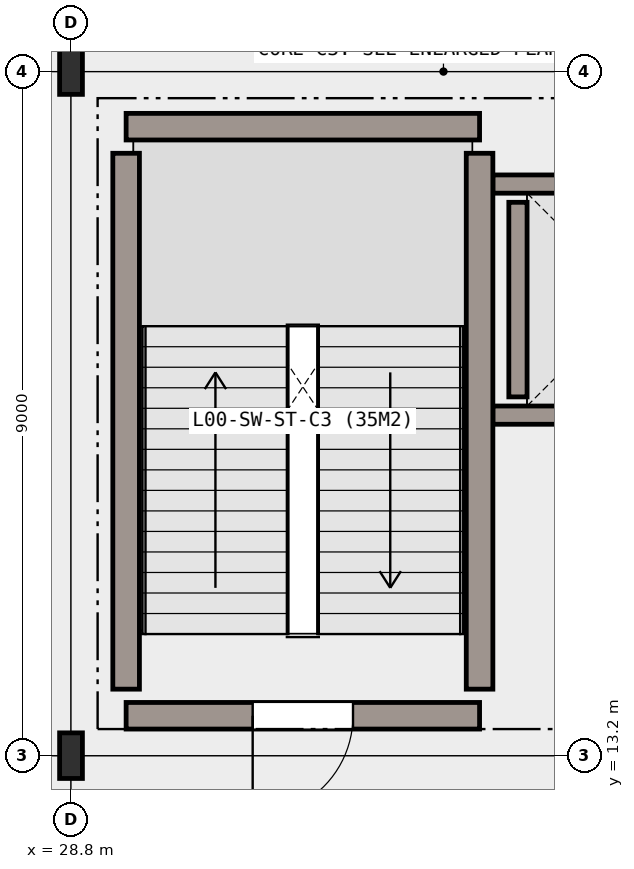
"""IFC4 building model, lengths in metres.
Left out: names, types, materials, properties, quantities, classifications, styles, units other than length and angle.
Written with IfcOpenShell. Run it as: python <this file> out.ifc"""

import sys

from ifc_helpers import new_model, si_unit, direction, frame, frame_2d, origin, origin_2d, place, context, subcontext, project, spatial, rectangle, i_section, extrude, element, fill, save


model = new_model("IFC4")
c1 = context("Model", 3, precision=1e-05, world=origin(), true_north=direction((0.0, 1.0)))
c2 = subcontext(c1, "Body", "Model", "MODEL_VIEW")
j1 = project(units=[si_unit("LENGTHUNIT", "METRE"), si_unit("PLANEANGLEUNIT", "RADIAN")], contexts=[c1])
p1 = place(None, origin())
s1 = spatial("IfcSite", under=j1, at=p1, CompositionType="ELEMENT")
p2 = place(p1, origin())
s2 = spatial("IfcBuilding", under=s1, at=p2, CompositionType="ELEMENT")
p3 = place(p2, origin())
s3 = spatial("IfcBuildingStorey", under=s2, at=p3, CompositionType="ELEMENT", Elevation=0.0)
for number, where, z_axis, x_axis in (
    (1, (28.8, 13.2, 0.0), (0.0, 0.0, 1.0), (1.0, 0.0, 0.0)),
    (2, (28.8, 22.2, 0.0), (0.0, 0.0, 1.0), (1.0, 0.0, 0.0)),
):
    element("IfcColumn", number, at=place(p3, frame(where, z_axis=z_axis, x_axis=x_axis)), inside=s3, PredefinedType="COLUMN", context=c2, shape_type="SweptSolid", body=[
        extrude(i_section(OverallWidth=0.3, OverallDepth=0.6, WebThickness=0.015, FlangeThickness=0.03, FilletRadius=0.027, at=origin_2d()), origin(), (0.0, 0.0, 1.0), 5.4),
    ])
p4 = place(p3, frame((37.72, 17.68, 0.0), z_axis=(0.0, 0.0, 1.0), x_axis=(-1.0, 0.0, 0.0)))
e3 = element("IfcWall", 3, at=p4, inside=s3, PredefinedType="SHEAR", context=c2, shape_type="SweptSolid", body=[
    extrude(rectangle(XDim=3.37, YDim=0.24, at=frame_2d((1.685, 0.0))), origin(), (0.0, 0.0, 1.0), 5.12),
])
p5 = place(p4, frame((0.94, 0.0, 0.0)))
e4 = element("IfcOpeningElement", 4, at=p5, cuts=e3, PredefinedType="OPENING", context=c2, shape_type="SweptSolid", body=[
    extrude(rectangle(XDim=1.16, YDim=2.15, at=frame_2d((0.58, 1.075))), frame((0.0, 0.13, 0.0), z_axis=(0.0, -1.0, 0.0), x_axis=(1.0, 0.0, 0.0)), (0.0, 0.0, 1.0), 0.26),
])
p6 = place(p3, frame((34.35, 20.72, 0.0), z_axis=(0.0, 0.0, 1.0), x_axis=(1.0, 0.0, 0.0)))
e5 = element("IfcWall", 5, at=p6, inside=s3, PredefinedType="SHEAR", context=c2, shape_type="SweptSolid", body=[
    extrude(rectangle(XDim=3.37, YDim=0.24, at=frame_2d((1.685, 0.0))), origin(), (0.0, 0.0, 1.0), 5.12),
])
p7 = place(p3, frame((34.68, 17.92, 0.0), z_axis=(0.0, 0.0, 1.0), x_axis=(0.0, 1.0, 0.0)))
e6 = element("IfcWall", 6, at=p7, inside=s3, PredefinedType="SHEAR", context=c2, shape_type="SweptSolid", body=[
    extrude(rectangle(XDim=2.56, YDim=0.24, at=frame_2d((1.28, 0.0))), origin(), (0.0, 0.0, 1.0), 5.12),
])
p8 = place(p3, frame((34.175, 13.725, 0.0), z_axis=(0.0, 0.0, 1.0), x_axis=(-1.0, 0.0, 0.0)))
e7 = element("IfcWall", 7, at=p8, inside=s3, PredefinedType="SHEAR", context=c2, shape_type="SweptSolid", body=[
    extrude(rectangle(XDim=4.65, YDim=0.35, at=frame_2d((2.325, 0.0))), origin(), (0.0, 0.0, 1.0), 5.12),
])
p9 = place(p8, frame((1.665, 0.0, 0.0)))
e8 = element("IfcOpeningElement", 8, at=p9, cuts=e7, PredefinedType="OPENING", context=c2, shape_type="SweptSolid", body=[
    extrude(rectangle(XDim=1.32, YDim=2.15, at=frame_2d((0.66, 1.075))), frame((0.0, 0.185, 0.0), z_axis=(0.0, -1.0, 0.0), x_axis=(1.0, 0.0, 0.0)), (0.0, 0.0, 1.0), 0.37),
])
p10 = place(p3, frame((29.525, 21.475, 0.0), z_axis=(0.0, 0.0, 1.0), x_axis=(1.0, 0.0, 0.0)))
e9 = element("IfcWall", 9, at=p10, inside=s3, PredefinedType="SHEAR", context=c2, shape_type="SweptSolid", body=[
    extrude(rectangle(XDim=4.65, YDim=0.35, at=frame_2d((2.325, 0.0))), origin(), (0.0, 0.0, 1.0), 5.12),
])
for number, where, z_axis, x_axis in (
    (10, (29.525, 14.075, 0.0), (0.0, 0.0, 1.0), (0.0, 1.0, 0.0)),
    (11, (34.175, 21.125, 0.0), (0.0, 0.0, 1.0), (0.0, -1.0, 0.0)),
):
    element("IfcWall", number, at=place(p3, frame(where, z_axis=z_axis, x_axis=x_axis)), inside=s3, PredefinedType="SHEAR", context=c2, shape_type="SweptSolid", body=[
        extrude(rectangle(XDim=7.05, YDim=0.35, at=frame_2d((3.525, 0.0))), origin(), (0.0, 0.0, 1.0), 5.12),
    ])
p11 = place(p9, origin())
e12 = element("IfcDoor", 12, at=p11, inside=s3, OperationType="SINGLE_SWING_RIGHT", PredefinedType="DOOR", context=c2, shape_type="SweptSolid", body=[
    extrude(rectangle(XDim=1.32, YDim=2.15, at=frame_2d((0.66, 1.075))), frame((0.0, 0.025, 0.0), z_axis=(0.0, -1.0, 0.0), x_axis=(1.0, 0.0, 0.0)), (0.0, 0.0, 1.0), 0.05),
])
fill(e8, e12)
save(model, sys.argv[1])
